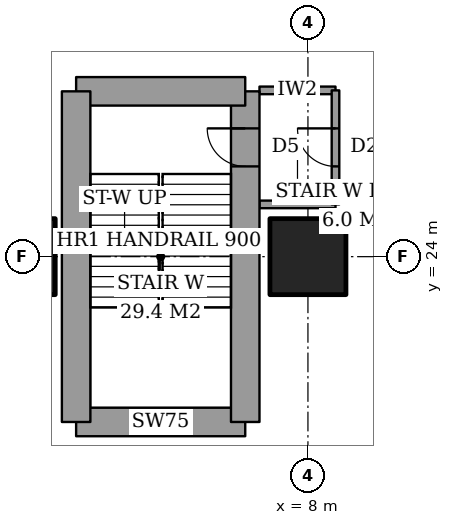
"""IFC4 building model, lengths in metres.
Left out: names, types, materials, properties, quantities, classifications, styles, units other than length and angle.
Written with IfcOpenShell. Run it as: python <this file> out.ifc"""

import sys

from ifc_helpers import new_model, si_unit, direction, frame, frame_2d, origin, origin_2d, place, context, subcontext, project, spatial, rectangle, extrude, element, fill, save


model = new_model("IFC4")
c1 = context("Model", 3, precision=1e-05, world=origin(), true_north=direction((0.0, 1.0)))
c2 = subcontext(c1, "Body", "Model", "MODEL_VIEW")
j1 = project(units=[si_unit("LENGTHUNIT", "METRE"), si_unit("PLANEANGLEUNIT", "RADIAN")], contexts=[c1])
p1 = place(None, origin())
s1 = spatial("IfcSite", under=j1, at=p1, CompositionType="ELEMENT")
p2 = place(p1, origin())
s2 = spatial("IfcBuilding", under=s1, at=p2, CompositionType="ELEMENT")
p3 = place(p2, frame((0.0, 0.0, -5.0)))
s3 = spatial("IfcBuildingStorey", under=s2, at=p3, CompositionType="ELEMENT", Elevation=-5.0)
for number, where, z_axis, x_axis in (
    (1, (0.35, 24.0, 0.0), (0.0, 0.0, 1.0), (1.0, 0.0, 0.0)),
    (2, (8.0, 24.0, 0.0), (0.0, 0.0, 1.0), (1.0, 0.0, 0.0)),
):
    element("IfcColumn", number, at=place(p3, frame(where, z_axis=z_axis, x_axis=x_axis)), inside=s3, PredefinedType="COLUMN", context=c2, shape_type="SweptSolid", body=[
        extrude(rectangle(XDim=2.0, YDim=2.0, at=origin_2d()), origin(), (0.0, 0.0, 1.0), 5.0),
    ])
p4 = place(p3, frame((1.9, 19.65, 0.0), z_axis=(0.0, 0.0, 1.0), x_axis=(1.0, 0.0, 0.0)))
e3 = element("IfcWall", 3, at=p4, inside=s3, PredefinedType="SHEAR", context=c2, shape_type="SweptSolid", body=[
    extrude(rectangle(XDim=4.45, YDim=0.75, at=frame_2d((2.225, 0.0))), origin(), (0.0, 0.0, 1.0), 5.0),
])
p5 = place(p3, frame((6.35, 19.65, 0.0), z_axis=(0.0, 0.0, 1.0), x_axis=(0.0, 1.0, 0.0)))
e4 = element("IfcWall", 4, at=p5, inside=s3, PredefinedType="SHEAR", context=c2, shape_type="SweptSolid", body=[
    extrude(rectangle(XDim=8.7, YDim=0.75, at=frame_2d((4.35, 0.0))), origin(), (0.0, 0.0, 1.0), 5.0),
])
p6 = place(p5, frame((6.725, 0.0, 0.0)))
e5 = element("IfcOpeningElement", 5, at=p6, cuts=e4, PredefinedType="OPENING", context=c2, shape_type="SweptSolid", body=[
    extrude(rectangle(XDim=1.0, YDim=2.1, at=frame_2d((0.5, 1.05))), frame((0.0, 0.385, 0.0), z_axis=(0.0, -1.0, 0.0), x_axis=(1.0, 0.0, 0.0)), (0.0, 0.0, 1.0), 0.77),
])
p7 = place(p3, frame((6.35, 28.35, 0.0), z_axis=(0.0, 0.0, 1.0), x_axis=(-1.0, 0.0, 0.0)))
e6 = element("IfcWall", 6, at=p7, inside=s3, PredefinedType="SHEAR", context=c2, shape_type="SweptSolid", body=[
    extrude(rectangle(XDim=4.45, YDim=0.75, at=frame_2d((2.225, 0.0))), origin(), (0.0, 0.0, 1.0), 5.0),
])
p8 = place(p3, frame((1.9, 28.35, 0.0), z_axis=(0.0, 0.0, 1.0), x_axis=(0.0, -1.0, 0.0)))
e7 = element("IfcWall", 7, at=p8, inside=s3, PredefinedType="SHEAR", context=c2, shape_type="SweptSolid", body=[
    extrude(rectangle(XDim=8.7, YDim=0.75, at=frame_2d((4.35, 0.0))), origin(), (0.0, 0.0, 1.0), 5.0),
])
for number, where, z_axis, x_axis in (
    (8, (6.725, 25.375, 0.0), (0.0, 0.0, 1.0), (1.0, 0.0, 0.0)),
    (9, (6.725, 28.375, 0.0), (0.0, 0.0, 1.0), (1.0, 0.0, 0.0)),
):
    element("IfcWall", number, at=place(p3, frame(where, z_axis=z_axis, x_axis=x_axis)), inside=s3, PredefinedType="PARTITIONING", context=c2, shape_type="SweptSolid", body=[
        extrude(rectangle(XDim=2.0, YDim=0.2, at=frame_2d((1.0, 0.0))), origin(), (0.0, 0.0, 1.0), 4.7),
    ])
p9 = place(p3, frame((8.725, 25.375, 0.0), z_axis=(0.0, 0.0, 1.0), x_axis=(0.0, 1.0, 0.0)))
e10 = element("IfcWall", 10, at=p9, inside=s3, PredefinedType="PARTITIONING", context=c2, shape_type="SweptSolid", body=[
    extrude(rectangle(XDim=3.0, YDim=0.2, at=frame_2d((1.5, 0.0))), origin(), (0.0, 0.0, 1.0), 4.7),
])
p10 = place(p9, frame((1.0, 0.0, 0.0)))
e11 = element("IfcOpeningElement", 11, at=p10, cuts=e10, PredefinedType="OPENING", context=c2, shape_type="SweptSolid", body=[
    extrude(rectangle(XDim=1.0, YDim=2.1, at=frame_2d((0.5, 1.05))), frame((0.0, 0.11, 0.0), z_axis=(0.0, -1.0, 0.0), x_axis=(1.0, 0.0, 0.0)), (0.0, 0.0, 1.0), 0.22),
])
p11 = place(p10, origin())
e12 = element("IfcDoor", 12, at=p11, inside=s3, OperationType="SINGLE_SWING_LEFT", PredefinedType="DOOR", context=c2, shape_type="SweptSolid", body=[
    extrude(rectangle(XDim=1.0, YDim=2.1, at=frame_2d((0.5, 1.05))), frame((0.0, 0.025, 0.0), z_axis=(0.0, -1.0, 0.0), x_axis=(1.0, 0.0, 0.0)), (0.0, 0.0, 1.0), 0.05),
])
fill(e11, e12)
p12 = place(p6, origin())
e13 = element("IfcDoor", 13, at=p12, inside=s3, OperationType="SINGLE_SWING_LEFT", PredefinedType="DOOR", context=c2, shape_type="SweptSolid", body=[
    extrude(rectangle(XDim=1.0, YDim=2.1, at=frame_2d((0.5, 1.05))), frame((0.0, 0.025, 0.0), z_axis=(0.0, -1.0, 0.0), x_axis=(1.0, 0.0, 0.0)), (0.0, 0.0, 1.0), 0.05),
])
fill(e5, e13)
save(model, sys.argv[1])
